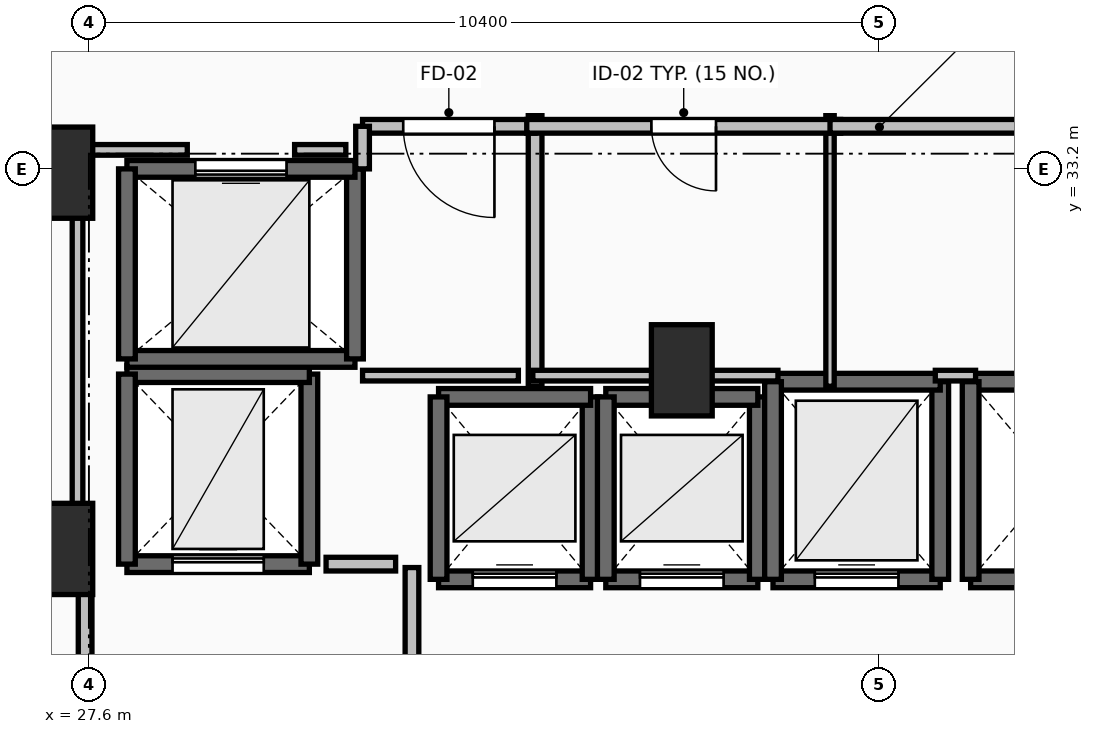
"""IFC4 building model, lengths in metres.
Left out: names, types, materials, properties, quantities, classifications, styles, units other than length and angle.
Written with IfcOpenShell. Run it as: python <this file> out.ifc"""

import sys

from ifc_helpers import new_model, si_unit, direction, frame, frame_2d, origin, origin_2d, place, context, subcontext, project, spatial, rectangle, extrude, element, fill, save


model = new_model("IFC4")
c1 = context("Model", 3, precision=1e-05, world=origin(), true_north=direction((0.0, 1.0)))
c2 = subcontext(c1, "Body", "Model", "MODEL_VIEW")
j1 = project(units=[si_unit("LENGTHUNIT", "METRE"), si_unit("PLANEANGLEUNIT", "RADIAN")], contexts=[c1])
p1 = place(None, origin())
s1 = spatial("IfcSite", under=j1, at=p1, CompositionType="ELEMENT")
p2 = place(p1, origin())
s2 = spatial("IfcBuilding", under=s1, at=p2, CompositionType="ELEMENT")
p3 = place(p2, frame((0.0, 0.0, 66.0)))
s3 = spatial("IfcBuildingStorey", under=s2, at=p3, CompositionType="ELEMENT", Elevation=66.0)
for number, where, z_axis, x_axis in (
    (1, (27.25, 28.2, 0.0), (0.0, 0.0, 1.0), (1.0, 0.0, 0.0)),
    (2, (27.25, 33.15, 0.0), (0.0, 0.0, 1.0), (1.0, 0.0, 0.0)),
    (3, (35.4, 30.55, 0.0), (0.0, 0.0, 1.0), (1.0, 0.0, 0.0)),
):
    element("IfcColumn", number, at=place(p3, frame(where, z_axis=z_axis, x_axis=x_axis)), inside=s3, PredefinedType="PILASTER", context=c2, shape_type="SweptSolid", body=[
        extrude(rectangle(XDim=0.8, YDim=1.2, at=origin_2d()), origin(), (0.0, 0.0, 1.0), 3.5),
    ])
p4 = place(p3, frame((32.2, 27.8, 0.0), z_axis=(0.0, 0.0, 1.0), x_axis=(1.0, 0.0, 0.0)))
e4 = element("IfcWall", 4, at=p4, inside=s3, PredefinedType="SOLIDWALL", context=c2, shape_type="SweptSolid", body=[
    extrude(rectangle(XDim=2.0, YDim=0.22, at=frame_2d((1.0, 0.0))), origin(), (0.0, 0.0, 1.0), 3.15),
])
p5 = place(p4, frame((0.45, 0.0, 0.0)))
e5 = element("IfcOpeningElement", 5, at=p5, cuts=e4, PredefinedType="OPENING", context=c2, shape_type="SweptSolid", body=[
    extrude(rectangle(XDim=1.1, YDim=2.2, at=frame_2d((0.55, 1.1))), frame((0.0, 0.125, 0.0), z_axis=(0.0, -1.0, 0.0), x_axis=(1.0, 0.0, 0.0)), (0.0, 0.0, 1.0), 0.25),
])
p6 = place(p3, frame((34.2, 27.8, 0.0), z_axis=(0.0, 0.0, 1.0), x_axis=(0.0, 1.0, 0.0)))
e6 = element("IfcWall", 6, at=p6, inside=s3, PredefinedType="SOLIDWALL", context=c2, shape_type="SweptSolid", body=[
    extrude(rectangle(XDim=2.4, YDim=0.22, at=frame_2d((1.2, 0.0))), origin(), (0.0, 0.0, 1.0), 3.15),
])
p7 = place(p3, frame((34.2, 30.2, 0.0), z_axis=(0.0, 0.0, 1.0), x_axis=(-1.0, 0.0, 0.0)))
e7 = element("IfcWall", 7, at=p7, inside=s3, PredefinedType="SOLIDWALL", context=c2, shape_type="SweptSolid", body=[
    extrude(rectangle(XDim=2.0, YDim=0.22, at=frame_2d((1.0, 0.0))), origin(), (0.0, 0.0, 1.0), 3.15),
])
p8 = place(p3, frame((32.2, 30.2, 0.0), z_axis=(0.0, 0.0, 1.0), x_axis=(0.0, -1.0, 0.0)))
e8 = element("IfcWall", 8, at=p8, inside=s3, PredefinedType="SOLIDWALL", context=c2, shape_type="SweptSolid", body=[
    extrude(rectangle(XDim=2.4, YDim=0.22, at=frame_2d((1.2, 0.0))), origin(), (0.0, 0.0, 1.0), 3.15),
])
p9 = place(p3, frame((34.4, 27.8, 0.0), z_axis=(0.0, 0.0, 1.0), x_axis=(1.0, 0.0, 0.0)))
e9 = element("IfcWall", 9, at=p9, inside=s3, PredefinedType="SOLIDWALL", context=c2, shape_type="SweptSolid", body=[
    extrude(rectangle(XDim=2.0, YDim=0.22, at=frame_2d((1.0, 0.0))), origin(), (0.0, 0.0, 1.0), 3.15),
])
p10 = place(p9, frame((0.45, 0.0, 0.0)))
e10 = element("IfcOpeningElement", 10, at=p10, cuts=e9, PredefinedType="OPENING", context=c2, shape_type="SweptSolid", body=[
    extrude(rectangle(XDim=1.1, YDim=2.2, at=frame_2d((0.55, 1.1))), frame((0.0, 0.125, 0.0), z_axis=(0.0, -1.0, 0.0), x_axis=(1.0, 0.0, 0.0)), (0.0, 0.0, 1.0), 0.25),
])
p11 = place(p3, frame((36.4, 27.8, 0.0), z_axis=(0.0, 0.0, 1.0), x_axis=(0.0, 1.0, 0.0)))
e11 = element("IfcWall", 11, at=p11, inside=s3, PredefinedType="SOLIDWALL", context=c2, shape_type="SweptSolid", body=[
    extrude(rectangle(XDim=2.4, YDim=0.22, at=frame_2d((1.2, 0.0))), origin(), (0.0, 0.0, 1.0), 3.15),
])
p12 = place(p3, frame((36.4, 30.2, 0.0), z_axis=(0.0, 0.0, 1.0), x_axis=(-1.0, 0.0, 0.0)))
e12 = element("IfcWall", 12, at=p12, inside=s3, PredefinedType="SOLIDWALL", context=c2, shape_type="SweptSolid", body=[
    extrude(rectangle(XDim=2.0, YDim=0.22, at=frame_2d((1.0, 0.0))), origin(), (0.0, 0.0, 1.0), 3.15),
])
p13 = place(p3, frame((34.4, 30.2, 0.0), z_axis=(0.0, 0.0, 1.0), x_axis=(0.0, -1.0, 0.0)))
e13 = element("IfcWall", 13, at=p13, inside=s3, PredefinedType="SOLIDWALL", context=c2, shape_type="SweptSolid", body=[
    extrude(rectangle(XDim=2.4, YDim=0.22, at=frame_2d((1.2, 0.0))), origin(), (0.0, 0.0, 1.0), 3.15),
])
p14 = place(p3, frame((36.6, 27.8, 0.0), z_axis=(0.0, 0.0, 1.0), x_axis=(1.0, 0.0, 0.0)))
e14 = element("IfcWall", 14, at=p14, inside=s3, PredefinedType="SOLIDWALL", context=c2, shape_type="SweptSolid", body=[
    extrude(rectangle(XDim=2.2, YDim=0.22, at=frame_2d((1.1, 0.0))), origin(), (0.0, 0.0, 1.0), 3.15),
])
p15 = place(p14, frame((0.55, 0.0, 0.0)))
e15 = element("IfcOpeningElement", 15, at=p15, cuts=e14, PredefinedType="OPENING", context=c2, shape_type="SweptSolid", body=[
    extrude(rectangle(XDim=1.1, YDim=2.2, at=frame_2d((0.55, 1.1))), frame((0.0, 0.125, 0.0), z_axis=(0.0, -1.0, 0.0), x_axis=(1.0, 0.0, 0.0)), (0.0, 0.0, 1.0), 0.25),
])
p16 = place(p3, frame((38.8, 27.8, 0.0), z_axis=(0.0, 0.0, 1.0), x_axis=(0.0, 1.0, 0.0)))
e16 = element("IfcWall", 16, at=p16, inside=s3, PredefinedType="SOLIDWALL", context=c2, shape_type="SweptSolid", body=[
    extrude(rectangle(XDim=2.6, YDim=0.22, at=frame_2d((1.3, 0.0))), origin(), (0.0, 0.0, 1.0), 3.15),
])
p17 = place(p3, frame((38.8, 30.4, 0.0), z_axis=(0.0, 0.0, 1.0), x_axis=(-1.0, 0.0, 0.0)))
e17 = element("IfcWall", 17, at=p17, inside=s3, PredefinedType="SOLIDWALL", context=c2, shape_type="SweptSolid", body=[
    extrude(rectangle(XDim=2.2, YDim=0.22, at=frame_2d((1.1, 0.0))), origin(), (0.0, 0.0, 1.0), 3.15),
])
p18 = place(p3, frame((36.6, 30.4, 0.0), z_axis=(0.0, 0.0, 1.0), x_axis=(0.0, -1.0, 0.0)))
e18 = element("IfcWall", 18, at=p18, inside=s3, PredefinedType="SOLIDWALL", context=c2, shape_type="SweptSolid", body=[
    extrude(rectangle(XDim=2.6, YDim=0.22, at=frame_2d((1.3, 0.0))), origin(), (0.0, 0.0, 1.0), 3.15),
])
for number, where, z_axis, x_axis in (
    (19, (39.2, 27.8, 0.0), (0.0, 0.0, 1.0), (1.0, 0.0, 0.0)),
    (20, (41.4, 30.4, 0.0), (0.0, 0.0, 1.0), (-1.0, 0.0, 0.0)),
):
    element("IfcWall", number, at=place(p3, frame(where, z_axis=z_axis, x_axis=x_axis)), inside=s3, PredefinedType="SOLIDWALL", context=c2, shape_type="SweptSolid", body=[
        extrude(rectangle(XDim=2.2, YDim=0.22, at=frame_2d((1.1, 0.0))), origin(), (0.0, 0.0, 1.0), 3.15),
    ])
p19 = place(p3, frame((39.2, 30.4, 0.0), z_axis=(0.0, 0.0, 1.0), x_axis=(0.0, -1.0, 0.0)))
e21 = element("IfcWall", 21, at=p19, inside=s3, PredefinedType="SOLIDWALL", context=c2, shape_type="SweptSolid", body=[
    extrude(rectangle(XDim=2.6, YDim=0.22, at=frame_2d((1.3, 0.0))), origin(), (0.0, 0.0, 1.0), 3.15),
])
p20 = place(p3, frame((28.1, 28.0, 0.0), z_axis=(0.0, 0.0, 1.0), x_axis=(1.0, 0.0, 0.0)))
e22 = element("IfcWall", 22, at=p20, inside=s3, PredefinedType="SHEAR", context=c2, shape_type="SweptSolid", body=[
    extrude(rectangle(XDim=2.4, YDim=0.22, at=frame_2d((1.2, 0.0))), origin(), (0.0, 0.0, 1.0), 3.15),
])
p21 = place(p20, frame((0.6, 0.0, 0.0)))
e23 = element("IfcOpeningElement", 23, at=p21, cuts=e22, PredefinedType="OPENING", context=c2, shape_type="SweptSolid", body=[
    extrude(rectangle(XDim=1.2, YDim=2.2, at=frame_2d((0.6, 1.1))), frame((0.0, 0.125, 0.0), z_axis=(0.0, -1.0, 0.0), x_axis=(1.0, 0.0, 0.0)), (0.0, 0.0, 1.0), 0.25),
])
p22 = place(p3, frame((30.5, 28.0, 0.0), z_axis=(0.0, 0.0, 1.0), x_axis=(0.0, 1.0, 0.0)))
e24 = element("IfcWall", 24, at=p22, inside=s3, PredefinedType="SHEAR", context=c2, shape_type="SweptSolid", body=[
    extrude(rectangle(XDim=2.5, YDim=0.22, at=frame_2d((1.25, 0.0))), origin(), (0.0, 0.0, 1.0), 3.15),
])
p23 = place(p3, frame((30.5, 30.5, 0.0), z_axis=(0.0, 0.0, 1.0), x_axis=(-1.0, 0.0, 0.0)))
e25 = element("IfcWall", 25, at=p23, inside=s3, PredefinedType="SHEAR", context=c2, shape_type="SweptSolid", body=[
    extrude(rectangle(XDim=2.4, YDim=0.22, at=frame_2d((1.2, 0.0))), origin(), (0.0, 0.0, 1.0), 3.15),
])
p24 = place(p3, frame((28.1, 30.5, 0.0), z_axis=(0.0, 0.0, 1.0), x_axis=(0.0, -1.0, 0.0)))
e26 = element("IfcWall", 26, at=p24, inside=s3, PredefinedType="SHEAR", context=c2, shape_type="SweptSolid", body=[
    extrude(rectangle(XDim=2.5, YDim=0.22, at=frame_2d((1.25, 0.0))), origin(), (0.0, 0.0, 1.0), 3.15),
])
p25 = place(p3, frame((28.1, 30.7, 0.0), z_axis=(0.0, 0.0, 1.0), x_axis=(1.0, 0.0, 0.0)))
e27 = element("IfcWall", 27, at=p25, inside=s3, PredefinedType="SOLIDWALL", context=c2, shape_type="SweptSolid", body=[
    extrude(rectangle(XDim=3.0, YDim=0.22, at=frame_2d((1.5, 0.0))), origin(), (0.0, 0.0, 1.0), 3.15),
])
p26 = place(p3, frame((31.1, 30.7, 0.0), z_axis=(0.0, 0.0, 1.0), x_axis=(0.0, 1.0, 0.0)))
e28 = element("IfcWall", 28, at=p26, inside=s3, PredefinedType="SOLIDWALL", context=c2, shape_type="SweptSolid", body=[
    extrude(rectangle(XDim=2.5, YDim=0.22, at=frame_2d((1.25, 0.0))), origin(), (0.0, 0.0, 1.0), 3.15),
])
p27 = place(p3, frame((31.1, 33.2, 0.0), z_axis=(0.0, 0.0, 1.0), x_axis=(-1.0, 0.0, 0.0)))
e29 = element("IfcWall", 29, at=p27, inside=s3, PredefinedType="SOLIDWALL", context=c2, shape_type="SweptSolid", body=[
    extrude(rectangle(XDim=3.0, YDim=0.22, at=frame_2d((1.5, 0.0))), origin(), (0.0, 0.0, 1.0), 3.15),
])
p28 = place(p27, frame((0.9, 0.0, 0.0)))
e30 = element("IfcOpeningElement", 30, at=p28, cuts=e29, PredefinedType="OPENING", context=c2, shape_type="SweptSolid", body=[
    extrude(rectangle(XDim=1.2, YDim=2.2, at=frame_2d((0.6, 1.1))), frame((0.0, 0.125, 0.0), z_axis=(0.0, -1.0, 0.0), x_axis=(1.0, 0.0, 0.0)), (0.0, 0.0, 1.0), 0.25),
])
p29 = place(p3, frame((28.1, 33.2, 0.0), z_axis=(0.0, 0.0, 1.0), x_axis=(0.0, -1.0, 0.0)))
e31 = element("IfcWall", 31, at=p29, inside=s3, PredefinedType="SOLIDWALL", context=c2, shape_type="SweptSolid", body=[
    extrude(rectangle(XDim=2.5, YDim=0.22, at=frame_2d((1.25, 0.0))), origin(), (0.0, 0.0, 1.0), 3.15),
])
p30 = place(p3, frame((31.85, 24.045, 0.0), z_axis=(0.0, 0.0, 1.0), x_axis=(0.0, 1.0, 0.0)))
e32 = element("IfcWall", 32, at=p30, inside=s3, PredefinedType="PARTITIONING", context=c2, shape_type="SweptSolid", body=[
    extrude(rectangle(XDim=3.91, YDim=0.18, at=frame_2d((1.955, 0.0))), origin(), (0.0, 0.0, 1.0), 3.15),
])
p31 = place(p30, frame((1.355, 0.0, 0.0)))
e33 = element("IfcOpeningElement", 33, at=p31, cuts=e32, PredefinedType="OPENING", context=c2, shape_type="SweptSolid", body=[
    extrude(rectangle(XDim=1.2, YDim=2.15, at=frame_2d((0.6, 1.075))), frame((0.0, 0.105, 0.0), z_axis=(0.0, -1.0, 0.0), x_axis=(1.0, 0.0, 0.0)), (0.0, 0.0, 1.0), 0.21),
])
p32 = place(p3, frame((27.55, 28.0, 0.0), z_axis=(0.0, 0.0, 1.0), x_axis=(0.0, -1.0, 0.0)))
e34 = element("IfcWall", 34, at=p32, inside=s3, PredefinedType="PARTITIONING", context=c2, shape_type="SweptSolid", body=[
    extrude(rectangle(XDim=4.05, YDim=0.18, at=frame_2d((2.025, 0.0))), origin(), (0.0, 0.0, 1.0), 3.15),
])
p33 = place(p32, frame((1.425, 0.0, 0.0)))
e35 = element("IfcOpeningElement", 35, at=p33, cuts=e34, PredefinedType="OPENING", context=c2, shape_type="SweptSolid", body=[
    extrude(rectangle(XDim=1.2, YDim=2.15, at=frame_2d((0.6, 1.075))), frame((0.0, 0.105, 0.0), z_axis=(0.0, -1.0, 0.0), x_axis=(1.0, 0.0, 0.0)), (0.0, 0.0, 1.0), 0.21),
])
p34 = place(p3, frame((33.47, 30.34, 0.0), z_axis=(0.0, 0.0, 1.0), x_axis=(0.0, 1.0, 0.0)))
e36 = element("IfcWall", 36, at=p34, inside=s3, PredefinedType="PARTITIONING", context=c2, shape_type="SweptSolid", body=[
    extrude(rectangle(XDim=3.56, YDim=0.18, at=frame_2d((1.78, 0.0))), origin(), (0.0, 0.0, 1.0), 3.15),
])
p35 = place(p3, frame((33.47, 33.76, 0.0), z_axis=(0.0, 0.0, 1.0), x_axis=(-1.0, 0.0, 0.0)))
e37 = element("IfcWall", 37, at=p35, inside=s3, PredefinedType="PARTITIONING", context=c2, shape_type="SweptSolid", body=[
    extrude(rectangle(XDim=2.27, YDim=0.18, at=frame_2d((1.135, 0.0))), origin(), (0.0, 0.0, 1.0), 3.15),
])
p36 = place(p35, frame((0.535, 0.0, 0.0)))
e38 = element("IfcOpeningElement", 38, at=p36, cuts=e37, PredefinedType="OPENING", context=c2, shape_type="SweptSolid", body=[
    extrude(rectangle(XDim=1.2, YDim=2.15, at=frame_2d((0.6, 1.075))), frame((0.0, 0.105, 0.0), z_axis=(0.0, -1.0, 0.0), x_axis=(1.0, 0.0, 0.0)), (0.0, 0.0, 1.0), 0.21),
])
p37 = place(p3, frame((31.2, 33.76, 0.0), z_axis=(0.0, 0.0, 1.0), x_axis=(0.0, -1.0, 0.0)))
e39 = element("IfcWall", 39, at=p37, inside=s3, PredefinedType="PARTITIONING", context=c2, shape_type="SweptSolid", body=[
    extrude(rectangle(XDim=0.56, YDim=0.18, at=frame_2d((0.28, 0.0))), origin(), (0.0, 0.0, 1.0), 3.15),
])
p38 = place(p3, frame((37.35, 30.34, 0.0), z_axis=(0.0, 0.0, 1.0), x_axis=(0.0, 1.0, 0.0)))
e40 = element("IfcWall", 40, at=p38, inside=s3, PredefinedType="PARTITIONING", context=c2, shape_type="SweptSolid", body=[
    extrude(rectangle(XDim=3.56, YDim=0.11, at=frame_2d((1.78, 0.0))), origin(), (0.0, 0.0, 1.0), 2.342),
])
p39 = place(p3, frame((37.49, 33.76, 0.0), z_axis=(0.0, 0.0, 1.0), x_axis=(-1.0, 0.0, 0.0)))
e41 = element("IfcWall", 41, at=p39, inside=s3, PredefinedType="PARTITIONING", context=c2, shape_type="SweptSolid", body=[
    extrude(rectangle(XDim=4.13, YDim=0.18, at=frame_2d((2.065, 0.0))), origin(), (0.0, 0.0, 1.0), 3.15),
])
p40 = place(p39, frame((1.64, 0.0, 0.0)))
e42 = element("IfcOpeningElement", 42, at=p40, cuts=e41, PredefinedType="OPENING", context=c2, shape_type="SweptSolid", body=[
    extrude(rectangle(XDim=0.85, YDim=2.1, at=frame_2d((0.425, 1.05))), frame((0.0, 0.105, 0.0), z_axis=(0.0, -1.0, 0.0), x_axis=(1.0, 0.0, 0.0)), (0.0, 0.0, 1.0), 0.21),
])
p41 = place(p3, frame((44.26, 33.76, 0.0), z_axis=(0.0, 0.0, 1.0), x_axis=(-1.0, 0.0, 0.0)))
e43 = element("IfcWall", 43, at=p41, inside=s3, PredefinedType="PARTITIONING", context=c2, shape_type="SweptSolid", body=[
    extrude(rectangle(XDim=6.91, YDim=0.18, at=frame_2d((3.455, 0.0))), origin(), (0.0, 0.0, 1.0), 3.15),
])
p42 = place(p41, frame((3.03, 0.0, 0.0)))
e44 = element("IfcOpeningElement", 44, at=p42, cuts=e43, PredefinedType="OPENING", context=c2, shape_type="SweptSolid", body=[
    extrude(rectangle(XDim=0.85, YDim=2.1, at=frame_2d((0.425, 1.05))), frame((0.0, 0.105, 0.0), z_axis=(0.0, -1.0, 0.0), x_axis=(1.0, 0.0, 0.0)), (0.0, 0.0, 1.0), 0.21),
])
p43 = place(p3, frame((31.635, 28.0, 0.0), z_axis=(0.0, 0.0, 1.0), x_axis=(-1.0, 0.0, 0.0)))
e45 = element("IfcWall", 45, at=p43, inside=s3, PredefinedType="PARTITIONING", context=c2, shape_type="SweptSolid", body=[
    extrude(rectangle(XDim=0.915, YDim=0.18, at=frame_2d((0.458, 0.0))), origin(), (0.0, 0.0, 1.0), 3.15),
])
p44 = place(p3, frame((31.2, 30.48, 0.0), z_axis=(0.0, 0.0, 1.0), x_axis=(1.0, 0.0, 0.0)))
e46 = element("IfcWall", 46, at=p44, inside=s3, PredefinedType="PARTITIONING", context=c2, shape_type="SweptSolid", body=[
    extrude(rectangle(XDim=2.05, YDim=0.14, at=frame_2d((1.025, 0.0))), origin(), (0.0, 0.0, 1.0), 3.15),
])
p45 = place(p3, frame((33.44, 30.48, 0.0), z_axis=(0.0, 0.0, 1.0), x_axis=(1.0, 0.0, 0.0)))
e47 = element("IfcWall", 47, at=p45, inside=s3, PredefinedType="PARTITIONING", context=c2, shape_type="SweptSolid", body=[
    extrude(rectangle(XDim=3.225, YDim=0.14, at=frame_2d((1.613, 0.0))), origin(), (0.0, 0.0, 1.0), 2.342),
])
p46 = place(p3, frame((38.735, 30.48, 0.0), z_axis=(0.0, 0.0, 1.0), x_axis=(1.0, 0.0, 0.0)))
e48 = element("IfcWall", 48, at=p46, inside=s3, PredefinedType="PARTITIONING", context=c2, shape_type="SweptSolid", body=[
    extrude(rectangle(XDim=0.53, YDim=0.14, at=frame_2d((0.265, 0.0))), origin(), (0.0, 0.0, 1.0), 2.342),
])
p47 = place(p3, frame((27.45, 28.196, 0.0), z_axis=(0.0, 0.0, 1.0), x_axis=(0.0, 1.0, 0.0)))
e49 = element("IfcWall", 49, at=p47, inside=s3, PredefinedType="PARTITIONING", context=c2, shape_type="SweptSolid", body=[
    extrude(rectangle(XDim=5.254, YDim=0.14, at=frame_2d((2.627, 0.0))), origin(), (0.0, 0.0, 1.0), 2.342),
])
p48 = place(p3, frame((27.45, 33.45, 0.0), z_axis=(0.0, 0.0, 1.0), x_axis=(1.0, 0.0, 0.0)))
e50 = element("IfcWall", 50, at=p48, inside=s3, PredefinedType="PARTITIONING", context=c2, shape_type="SweptSolid", body=[
    extrude(rectangle(XDim=1.444, YDim=0.14, at=frame_2d((0.722, 0.0))), origin(), (0.0, 0.0, 1.0), 2.342),
])
p49 = place(p3, frame((30.306, 33.45, 0.0), z_axis=(0.0, 0.0, 1.0), x_axis=(1.0, 0.0, 0.0)))
e51 = element("IfcWall", 51, at=p49, inside=s3, PredefinedType="PARTITIONING", context=c2, shape_type="SweptSolid", body=[
    extrude(rectangle(XDim=0.674, YDim=0.14, at=frame_2d((0.337, 0.0))), origin(), (0.0, 0.0, 1.0), 3.15),
])
p50 = place(p5, origin())
e52 = element("IfcDoor", 52, at=p50, inside=s3, OperationType="SLIDING_TO_LEFT", PredefinedType="DOOR", context=c2, shape_type="SweptSolid", body=[
    extrude(rectangle(XDim=1.1, YDim=2.2, at=frame_2d((0.55, 1.1))), frame((0.0, 0.025, 0.0), z_axis=(0.0, -1.0, 0.0), x_axis=(1.0, 0.0, 0.0)), (0.0, 0.0, 1.0), 0.05),
])
fill(e5, e52)
p51 = place(p10, origin())
e53 = element("IfcDoor", 53, at=p51, inside=s3, OperationType="SLIDING_TO_LEFT", PredefinedType="DOOR", context=c2, shape_type="SweptSolid", body=[
    extrude(rectangle(XDim=1.1, YDim=2.2, at=frame_2d((0.55, 1.1))), frame((0.0, 0.025, 0.0), z_axis=(0.0, -1.0, 0.0), x_axis=(1.0, 0.0, 0.0)), (0.0, 0.0, 1.0), 0.05),
])
fill(e10, e53)
p52 = place(p15, origin())
e54 = element("IfcDoor", 54, at=p52, inside=s3, OperationType="SLIDING_TO_LEFT", PredefinedType="DOOR", context=c2, shape_type="SweptSolid", body=[
    extrude(rectangle(XDim=1.1, YDim=2.2, at=frame_2d((0.55, 1.1))), frame((0.0, 0.025, 0.0), z_axis=(0.0, -1.0, 0.0), x_axis=(1.0, 0.0, 0.0)), (0.0, 0.0, 1.0), 0.05),
])
fill(e15, e54)
p53 = place(p21, origin())
e55 = element("IfcDoor", 55, at=p53, inside=s3, OperationType="SLIDING_TO_LEFT", PredefinedType="DOOR", context=c2, shape_type="SweptSolid", body=[
    extrude(rectangle(XDim=1.2, YDim=2.2, at=frame_2d((0.6, 1.1))), frame((0.0, 0.025, 0.0), z_axis=(0.0, -1.0, 0.0), x_axis=(1.0, 0.0, 0.0)), (0.0, 0.0, 1.0), 0.05),
])
fill(e23, e55)
p54 = place(p28, origin())
e56 = element("IfcDoor", 56, at=p54, inside=s3, OperationType="SLIDING_TO_LEFT", PredefinedType="DOOR", context=c2, shape_type="SweptSolid", body=[
    extrude(rectangle(XDim=1.2, YDim=2.2, at=frame_2d((0.6, 1.1))), frame((0.0, 0.025, 0.0), z_axis=(0.0, -1.0, 0.0), x_axis=(1.0, 0.0, 0.0)), (0.0, 0.0, 1.0), 0.05),
])
fill(e30, e56)
p55 = place(p36, origin())
e57 = element("IfcDoor", 57, at=p55, inside=s3, OperationType="SINGLE_SWING_LEFT", PredefinedType="DOOR", context=c2, shape_type="SweptSolid", body=[
    extrude(rectangle(XDim=1.2, YDim=2.15, at=frame_2d((0.6, 1.075))), frame((0.0, 0.025, 0.0), z_axis=(0.0, -1.0, 0.0), x_axis=(1.0, 0.0, 0.0)), (0.0, 0.0, 1.0), 0.05),
])
fill(e38, e57)
p56 = place(p40, origin())
e58 = element("IfcDoor", 58, at=p56, inside=s3, OperationType="SINGLE_SWING_LEFT", PredefinedType="DOOR", context=c2, shape_type="SweptSolid", body=[
    extrude(rectangle(XDim=0.85, YDim=2.1, at=frame_2d((0.425, 1.05))), frame((0.0, 0.025, 0.0), z_axis=(0.0, -1.0, 0.0), x_axis=(1.0, 0.0, 0.0)), (0.0, 0.0, 1.0), 0.05),
])
fill(e42, e58)
save(model, sys.argv[1])
